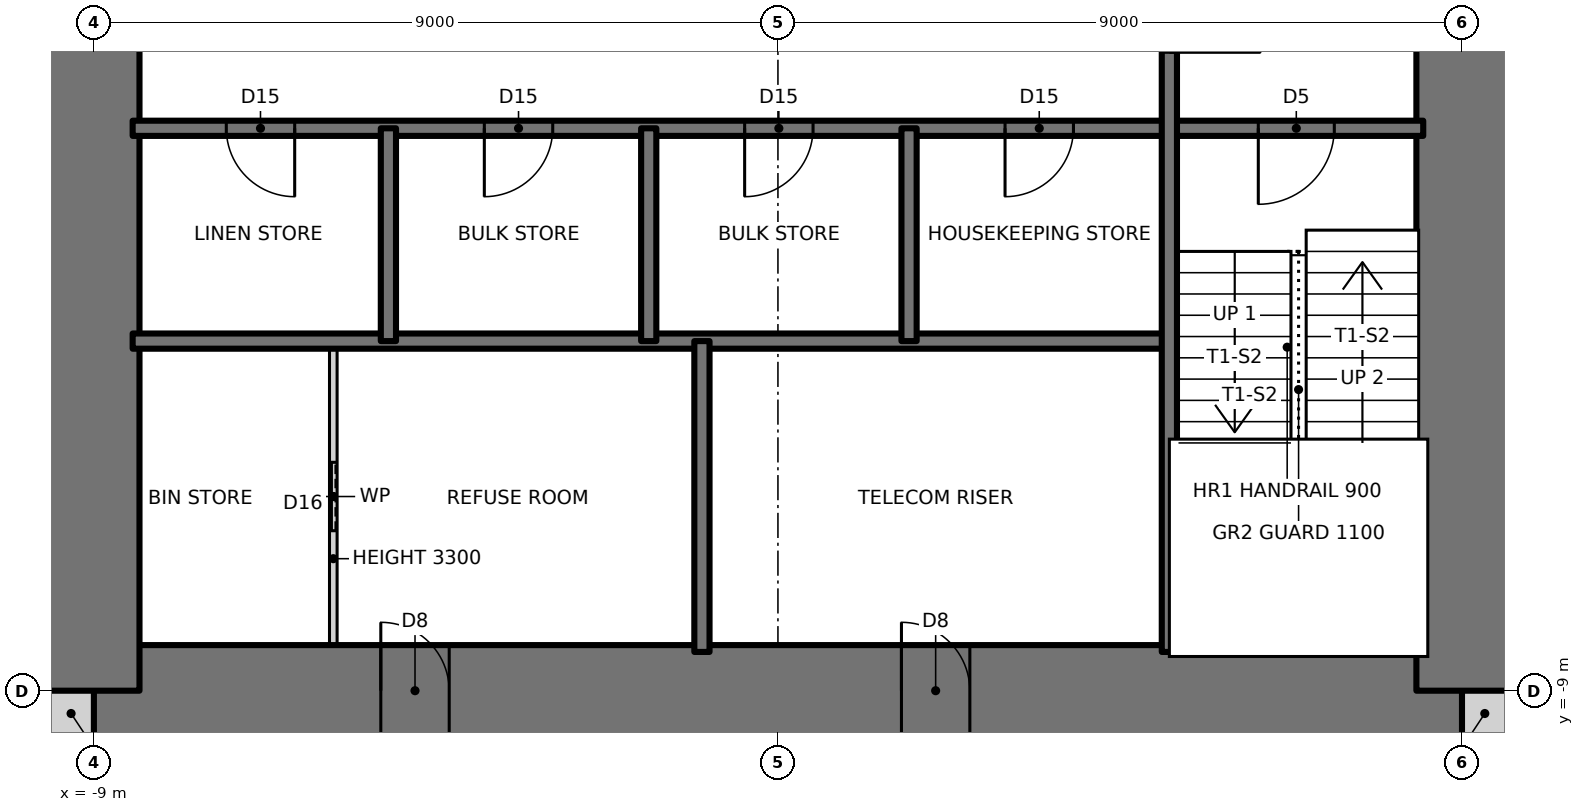
"""IFC4 building model, lengths in metres.
Left out: names, types, materials, properties, quantities, classifications, styles, units other than length and angle.
Written with IfcOpenShell. Run it as: python <this file> out.ifc"""

import sys

from ifc_helpers import new_model, si_unit, direction, frame, frame_2d, origin, place, context, subcontext, project, spatial, rectangle, extrude, element, fill, save


model = new_model("IFC4")
c1 = context("Model", 3, precision=1e-05, world=origin(), true_north=direction((0.0, 1.0)))
c2 = subcontext(c1, "Body", "Model", "MODEL_VIEW")
j1 = project(units=[si_unit("LENGTHUNIT", "METRE"), si_unit("PLANEANGLEUNIT", "RADIAN")], contexts=[c1])
p1 = place(None, origin())
s1 = spatial("IfcSite", under=j1, at=p1, CompositionType="ELEMENT")
p2 = place(p1, origin())
s2 = spatial("IfcBuilding", under=s1, at=p2, CompositionType="ELEMENT")
p3 = place(p2, frame((0.0, 0.0, 167.0)))
s3 = spatial("IfcBuildingStorey", under=s2, at=p3, CompositionType="ELEMENT", Elevation=167.0)
for number, where, z_axis, x_axis in (
    (1, (-9.6, -9.3, 0.0), (0.0, 0.0, 1.0), (1.0, 0.0, 0.0)),
    (2, (9.0, -9.3, 0.0), (0.0, 0.0, 1.0), (1.0, 0.0, 0.0)),
):
    element("IfcWall", number, at=place(p3, frame(where, z_axis=z_axis, x_axis=x_axis)), inside=s3, PredefinedType="SOLIDWALL", context=c2, shape_type="SweptSolid", body=[
        extrude(rectangle(XDim=0.6, YDim=0.6, at=frame_2d((0.3, 0.0))), origin(), (0.0, 0.0, 1.0), 3.5),
    ])
p4 = place(p3, frame((-9.0, -9.0, 0.0), z_axis=(0.0, 0.0, 1.0), x_axis=(1.0, 0.0, 0.0)))
e3 = element("IfcWall", 3, at=p4, inside=s3, PredefinedType="SHEAR", context=c2, shape_type="SweptSolid", body=[
    extrude(rectangle(XDim=18.0, YDim=1.2, at=frame_2d((9.0, 0.0))), origin(), (0.0, 0.0, 1.0), 3.5),
])
p5 = place(p4, frame((3.775, 0.0, 0.0)))
e4 = element("IfcOpeningElement", 4, at=p5, cuts=e3, PredefinedType="OPENING", context=c2, shape_type="SweptSolid", body=[
    extrude(rectangle(XDim=0.9, YDim=2.1, at=frame_2d((0.45, 1.05))), frame((0.0, 0.61, 0.0), z_axis=(0.0, -1.0, 0.0), x_axis=(1.0, 0.0, 0.0)), (0.0, 0.0, 1.0), 1.22),
])
p6 = place(p4, frame((10.625, 0.0, 0.0)))
e5 = element("IfcOpeningElement", 5, at=p6, cuts=e3, PredefinedType="OPENING", context=c2, shape_type="SweptSolid", body=[
    extrude(rectangle(XDim=0.9, YDim=2.1, at=frame_2d((0.45, 1.05))), frame((0.0, 0.61, 0.0), z_axis=(0.0, -1.0, 0.0), x_axis=(1.0, 0.0, 0.0)), (0.0, 0.0, 1.0), 1.22),
])
p7 = place(p3, frame((9.0, -9.0, 0.0), z_axis=(0.0, 0.0, 1.0), x_axis=(0.0, 1.0, 0.0)))
e6 = element("IfcWall", 6, at=p7, inside=s3, PredefinedType="SHEAR", context=c2, shape_type="SweptSolid", body=[
    extrude(rectangle(XDim=18.0, YDim=1.2, at=frame_2d((9.0, 0.0))), origin(), (0.0, 0.0, 1.0), 3.5),
])
p8 = place(p7, frame((8.5, 0.0, 0.0)))
e7 = element("IfcOpeningElement", 7, at=p8, cuts=e6, PredefinedType="OPENING", context=c2, shape_type="SweptSolid", body=[
    extrude(rectangle(XDim=1.0, YDim=2.1, at=frame_2d((0.5, 1.05))), frame((0.0, 0.61, 0.0), z_axis=(0.0, -1.0, 0.0), x_axis=(1.0, 0.0, 0.0)), (0.0, 0.0, 1.0), 1.22),
])
p9 = place(p3, frame((-9.0, 9.0, 0.0), z_axis=(0.0, 0.0, 1.0), x_axis=(0.0, -1.0, 0.0)))
e8 = element("IfcWall", 8, at=p9, inside=s3, PredefinedType="SHEAR", context=c2, shape_type="SweptSolid", body=[
    extrude(rectangle(XDim=18.0, YDim=1.2, at=frame_2d((9.0, 0.0))), origin(), (0.0, 0.0, 1.0), 3.5),
])
p10 = place(p9, frame((8.5, 0.0, 0.0)))
e9 = element("IfcOpeningElement", 9, at=p10, cuts=e8, PredefinedType="OPENING", context=c2, shape_type="SweptSolid", body=[
    extrude(rectangle(XDim=1.0, YDim=2.1, at=frame_2d((0.5, 1.05))), frame((0.0, 0.61, 0.0), z_axis=(0.0, -1.0, 0.0), x_axis=(1.0, 0.0, 0.0)), (0.0, 0.0, 1.0), 1.22),
])
p11 = place(p3, frame((-8.49, -4.4, 0.0), z_axis=(0.0, 0.0, 1.0), x_axis=(1.0, 0.0, 0.0)))
e10 = element("IfcWall", 10, at=p11, inside=s3, PredefinedType="SOLIDWALL", context=c2, shape_type="SweptSolid", body=[
    extrude(rectangle(XDim=13.64, YDim=0.2, at=frame_2d((6.82, 0.0))), origin(), (0.0, 0.0, 1.0), 3.5),
])
p12 = place(p3, frame((-8.49, -1.6, 0.0), z_axis=(0.0, 0.0, 1.0), x_axis=(1.0, 0.0, 0.0)))
e11 = element("IfcWall", 11, at=p12, inside=s3, PredefinedType="SOLIDWALL", context=c2, shape_type="SweptSolid", body=[
    extrude(rectangle(XDim=16.98, YDim=0.2, at=frame_2d((8.49, 0.0))), origin(), (0.0, 0.0, 1.0), 3.5),
])
p13 = place(p12, frame((14.81, 0.0, 0.0)))
e12 = element("IfcOpeningElement", 12, at=p13, cuts=e11, PredefinedType="OPENING", context=c2, shape_type="SweptSolid", body=[
    extrude(rectangle(XDim=1.0, YDim=2.1, at=frame_2d((0.5, 1.05))), frame((0.0, 0.11, 0.0), z_axis=(0.0, -1.0, 0.0), x_axis=(1.0, 0.0, 0.0)), (0.0, 0.0, 1.0), 0.22),
])
p14 = place(p12, frame((1.232, 0.0, 0.0)))
e13 = element("IfcOpeningElement", 13, at=p14, cuts=e11, PredefinedType="OPENING", context=c2, shape_type="SweptSolid", body=[
    extrude(rectangle(XDim=0.9, YDim=2.1, at=frame_2d((0.45, 1.05))), frame((0.0, 0.11, 0.0), z_axis=(0.0, -1.0, 0.0), x_axis=(1.0, 0.0, 0.0)), (0.0, 0.0, 1.0), 0.22),
])
p15 = place(p12, frame((4.627, 0.0, 0.0)))
e14 = element("IfcOpeningElement", 14, at=p15, cuts=e11, PredefinedType="OPENING", context=c2, shape_type="SweptSolid", body=[
    extrude(rectangle(XDim=0.9, YDim=2.1, at=frame_2d((0.45, 1.05))), frame((0.0, 0.11, 0.0), z_axis=(0.0, -1.0, 0.0), x_axis=(1.0, 0.0, 0.0)), (0.0, 0.0, 1.0), 0.22),
])
p16 = place(p12, frame((8.052, 0.0, 0.0)))
e15 = element("IfcOpeningElement", 15, at=p16, cuts=e11, PredefinedType="OPENING", context=c2, shape_type="SweptSolid", body=[
    extrude(rectangle(XDim=0.9, YDim=2.1, at=frame_2d((0.45, 1.05))), frame((0.0, 0.11, 0.0), z_axis=(0.0, -1.0, 0.0), x_axis=(1.0, 0.0, 0.0)), (0.0, 0.0, 1.0), 0.22),
])
p17 = place(p12, frame((11.478, 0.0, 0.0)))
e16 = element("IfcOpeningElement", 16, at=p17, cuts=e11, PredefinedType="OPENING", context=c2, shape_type="SweptSolid", body=[
    extrude(rectangle(XDim=0.9, YDim=2.1, at=frame_2d((0.45, 1.05))), frame((0.0, 0.11, 0.0), z_axis=(0.0, -1.0, 0.0), x_axis=(1.0, 0.0, 0.0)), (0.0, 0.0, 1.0), 0.22),
])
p18 = place(p3, frame((5.15, -8.49, 0.0), z_axis=(0.0, 0.0, 1.0), x_axis=(0.0, 1.0, 0.0)))
e17 = element("IfcWall", 17, at=p18, inside=s3, PredefinedType="SOLIDWALL", context=c2, shape_type="SweptSolid", body=[
    extrude(rectangle(XDim=13.09, YDim=0.2, at=frame_2d((6.545, 0.0))), origin(), (0.0, 0.0, 1.0), 3.5),
])
p19 = place(p18, frame((7.89, 0.0, 0.0)))
e18 = element("IfcOpeningElement", 18, at=p19, cuts=e17, PredefinedType="OPENING", context=c2, shape_type="SweptSolid", body=[
    extrude(rectangle(XDim=1.2, YDim=2.1, at=frame_2d((0.6, 1.05))), frame((0.0, 0.11, 0.0), z_axis=(0.0, -1.0, 0.0), x_axis=(1.0, 0.0, 0.0)), (0.0, 0.0, 1.0), 0.22),
])
p20 = place(p3, frame((1.725, -4.4, 0.0), z_axis=(0.0, 0.0, 1.0), x_axis=(0.0, 1.0, 0.0)))
e19 = element("IfcWall", 19, at=p20, inside=s3, PredefinedType="SOLIDWALL", context=c2, shape_type="SweptSolid", body=[
    extrude(rectangle(XDim=2.8, YDim=0.2, at=frame_2d((1.4, 0.0))), origin(), (0.0, 0.0, 1.0), 3.5),
])
p21 = place(p3, frame((-1.0, -8.49, 0.0), z_axis=(0.0, 0.0, 1.0), x_axis=(0.0, 1.0, 0.0)))
e20 = element("IfcWall", 20, at=p21, inside=s3, PredefinedType="SOLIDWALL", context=c2, shape_type="SweptSolid", body=[
    extrude(rectangle(XDim=4.09, YDim=0.2, at=frame_2d((2.045, 0.0))), origin(), (0.0, 0.0, 1.0), 3.5),
])
for number, where, z_axis, x_axis in (
    (21, (-1.7, -4.4, 0.0), (0.0, 0.0, 1.0), (0.0, 1.0, 0.0)),
    (22, (-5.125, -4.4, 0.0), (0.0, 0.0, 1.0), (0.0, 1.0, 0.0)),
):
    element("IfcWall", number, at=place(p3, frame(where, z_axis=z_axis, x_axis=x_axis)), inside=s3, PredefinedType="SOLIDWALL", context=c2, shape_type="SweptSolid", body=[
        extrude(rectangle(XDim=2.8, YDim=0.2, at=frame_2d((1.4, 0.0))), origin(), (0.0, 0.0, 1.0), 3.5),
    ])
p22 = place(p3, frame((-5.85, -8.49, 0.0), z_axis=(0.0, 0.0, 1.0), x_axis=(0.0, 1.0, 0.0)))
e23 = element("IfcWall", 23, at=p22, inside=s3, PredefinedType="PARTITIONING", context=c2, shape_type="SweptSolid", body=[
    extrude(rectangle(XDim=4.09, YDim=0.1, at=frame_2d((2.045, 0.0))), origin(), (0.0, 0.0, 1.0), 3.3),
])
p23 = place(p22, frame((1.595, 0.0, 0.0)))
e24 = element("IfcOpeningElement", 24, at=p23, cuts=e23, PredefinedType="OPENING", context=c2, shape_type="SweptSolid", body=[
    extrude(rectangle(XDim=0.9, YDim=2.1, at=frame_2d((0.45, 1.05))), frame((0.0, 0.06, 0.0), z_axis=(0.0, -1.0, 0.0), x_axis=(1.0, 0.0, 0.0)), (0.0, 0.0, 1.0), 0.12),
])
p24 = place(p13, frame((1.0, 0.0, 0.0), z_axis=(0.0, 0.0, 1.0), x_axis=(-1.0, 0.0, 0.0)))
e25 = element("IfcDoor", 25, at=p24, inside=s3, OperationType="SINGLE_SWING_RIGHT", PredefinedType="DOOR", context=c2, shape_type="SweptSolid", body=[
    extrude(rectangle(XDim=1.0, YDim=2.1, at=frame_2d((0.5, 1.05))), frame((0.0, 0.025, 0.0), z_axis=(0.0, -1.0, 0.0), x_axis=(1.0, 0.0, 0.0)), (0.0, 0.0, 1.0), 0.05),
])
fill(e12, e25)
p25 = place(p19, frame((1.2, 0.0, 0.0), z_axis=(0.0, 0.0, 1.0), x_axis=(-1.0, 0.0, 0.0)))
e26 = element("IfcDoor", 26, at=p25, inside=s3, OperationType="SINGLE_SWING_RIGHT", PredefinedType="DOOR", context=c2, shape_type="SweptSolid", body=[
    extrude(rectangle(XDim=1.2, YDim=2.1, at=frame_2d((0.6, 1.05))), frame((0.0, 0.025, 0.0), z_axis=(0.0, -1.0, 0.0), x_axis=(1.0, 0.0, 0.0)), (0.0, 0.0, 1.0), 0.05),
])
fill(e18, e26)
p26 = place(p14, frame((0.9, 0.0, 0.0), z_axis=(0.0, 0.0, 1.0), x_axis=(-1.0, 0.0, 0.0)))
e27 = element("IfcDoor", 27, at=p26, inside=s3, OperationType="SINGLE_SWING_LEFT", PredefinedType="DOOR", context=c2, shape_type="SweptSolid", body=[
    extrude(rectangle(XDim=0.9, YDim=2.1, at=frame_2d((0.45, 1.05))), frame((0.0, 0.025, 0.0), z_axis=(0.0, -1.0, 0.0), x_axis=(1.0, 0.0, 0.0)), (0.0, 0.0, 1.0), 0.05),
])
fill(e13, e27)
p27 = place(p15, frame((0.9, 0.0, 0.0), z_axis=(0.0, 0.0, 1.0), x_axis=(-1.0, 0.0, 0.0)))
e28 = element("IfcDoor", 28, at=p27, inside=s3, OperationType="SINGLE_SWING_RIGHT", PredefinedType="DOOR", context=c2, shape_type="SweptSolid", body=[
    extrude(rectangle(XDim=0.9, YDim=2.1, at=frame_2d((0.45, 1.05))), frame((0.0, 0.025, 0.0), z_axis=(0.0, -1.0, 0.0), x_axis=(1.0, 0.0, 0.0)), (0.0, 0.0, 1.0), 0.05),
])
fill(e14, e28)
p28 = place(p16, frame((0.9, 0.0, 0.0), z_axis=(0.0, 0.0, 1.0), x_axis=(-1.0, 0.0, 0.0)))
e29 = element("IfcDoor", 29, at=p28, inside=s3, OperationType="SINGLE_SWING_RIGHT", PredefinedType="DOOR", context=c2, shape_type="SweptSolid", body=[
    extrude(rectangle(XDim=0.9, YDim=2.1, at=frame_2d((0.45, 1.05))), frame((0.0, 0.025, 0.0), z_axis=(0.0, -1.0, 0.0), x_axis=(1.0, 0.0, 0.0)), (0.0, 0.0, 1.0), 0.05),
])
fill(e15, e29)
p29 = place(p17, frame((0.9, 0.0, 0.0), z_axis=(0.0, 0.0, 1.0), x_axis=(-1.0, 0.0, 0.0)))
e30 = element("IfcDoor", 30, at=p29, inside=s3, OperationType="SINGLE_SWING_RIGHT", PredefinedType="DOOR", context=c2, shape_type="SweptSolid", body=[
    extrude(rectangle(XDim=0.9, YDim=2.1, at=frame_2d((0.45, 1.05))), frame((0.0, 0.025, 0.0), z_axis=(0.0, -1.0, 0.0), x_axis=(1.0, 0.0, 0.0)), (0.0, 0.0, 1.0), 0.05),
])
fill(e16, e30)
p30 = place(p23, origin())
e31 = element("IfcDoor", 31, at=p30, inside=s3, OperationType="SLIDING_TO_LEFT", PredefinedType="DOOR", context=c2, shape_type="SweptSolid", body=[
    extrude(rectangle(XDim=0.9, YDim=2.1, at=frame_2d((0.45, 1.05))), frame((0.0, 0.025, 0.0), z_axis=(0.0, -1.0, 0.0), x_axis=(1.0, 0.0, 0.0)), (0.0, 0.0, 1.0), 0.05),
])
fill(e24, e31)
p31 = place(p5, origin())
e32 = element("IfcDoor", 32, at=p31, inside=s3, OperationType="SINGLE_SWING_LEFT", PredefinedType="DOOR", context=c2, shape_type="SweptSolid", body=[
    extrude(rectangle(XDim=0.9, YDim=2.1, at=frame_2d((0.45, 1.05))), frame((0.0, 0.025, 0.0), z_axis=(0.0, -1.0, 0.0), x_axis=(1.0, 0.0, 0.0)), (0.0, 0.0, 1.0), 0.05),
])
fill(e4, e32)
p32 = place(p6, origin())
e33 = element("IfcDoor", 33, at=p32, inside=s3, OperationType="SINGLE_SWING_LEFT", PredefinedType="DOOR", context=c2, shape_type="SweptSolid", body=[
    extrude(rectangle(XDim=0.9, YDim=2.1, at=frame_2d((0.45, 1.05))), frame((0.0, 0.025, 0.0), z_axis=(0.0, -1.0, 0.0), x_axis=(1.0, 0.0, 0.0)), (0.0, 0.0, 1.0), 0.05),
])
fill(e5, e33)
save(model, sys.argv[1])
